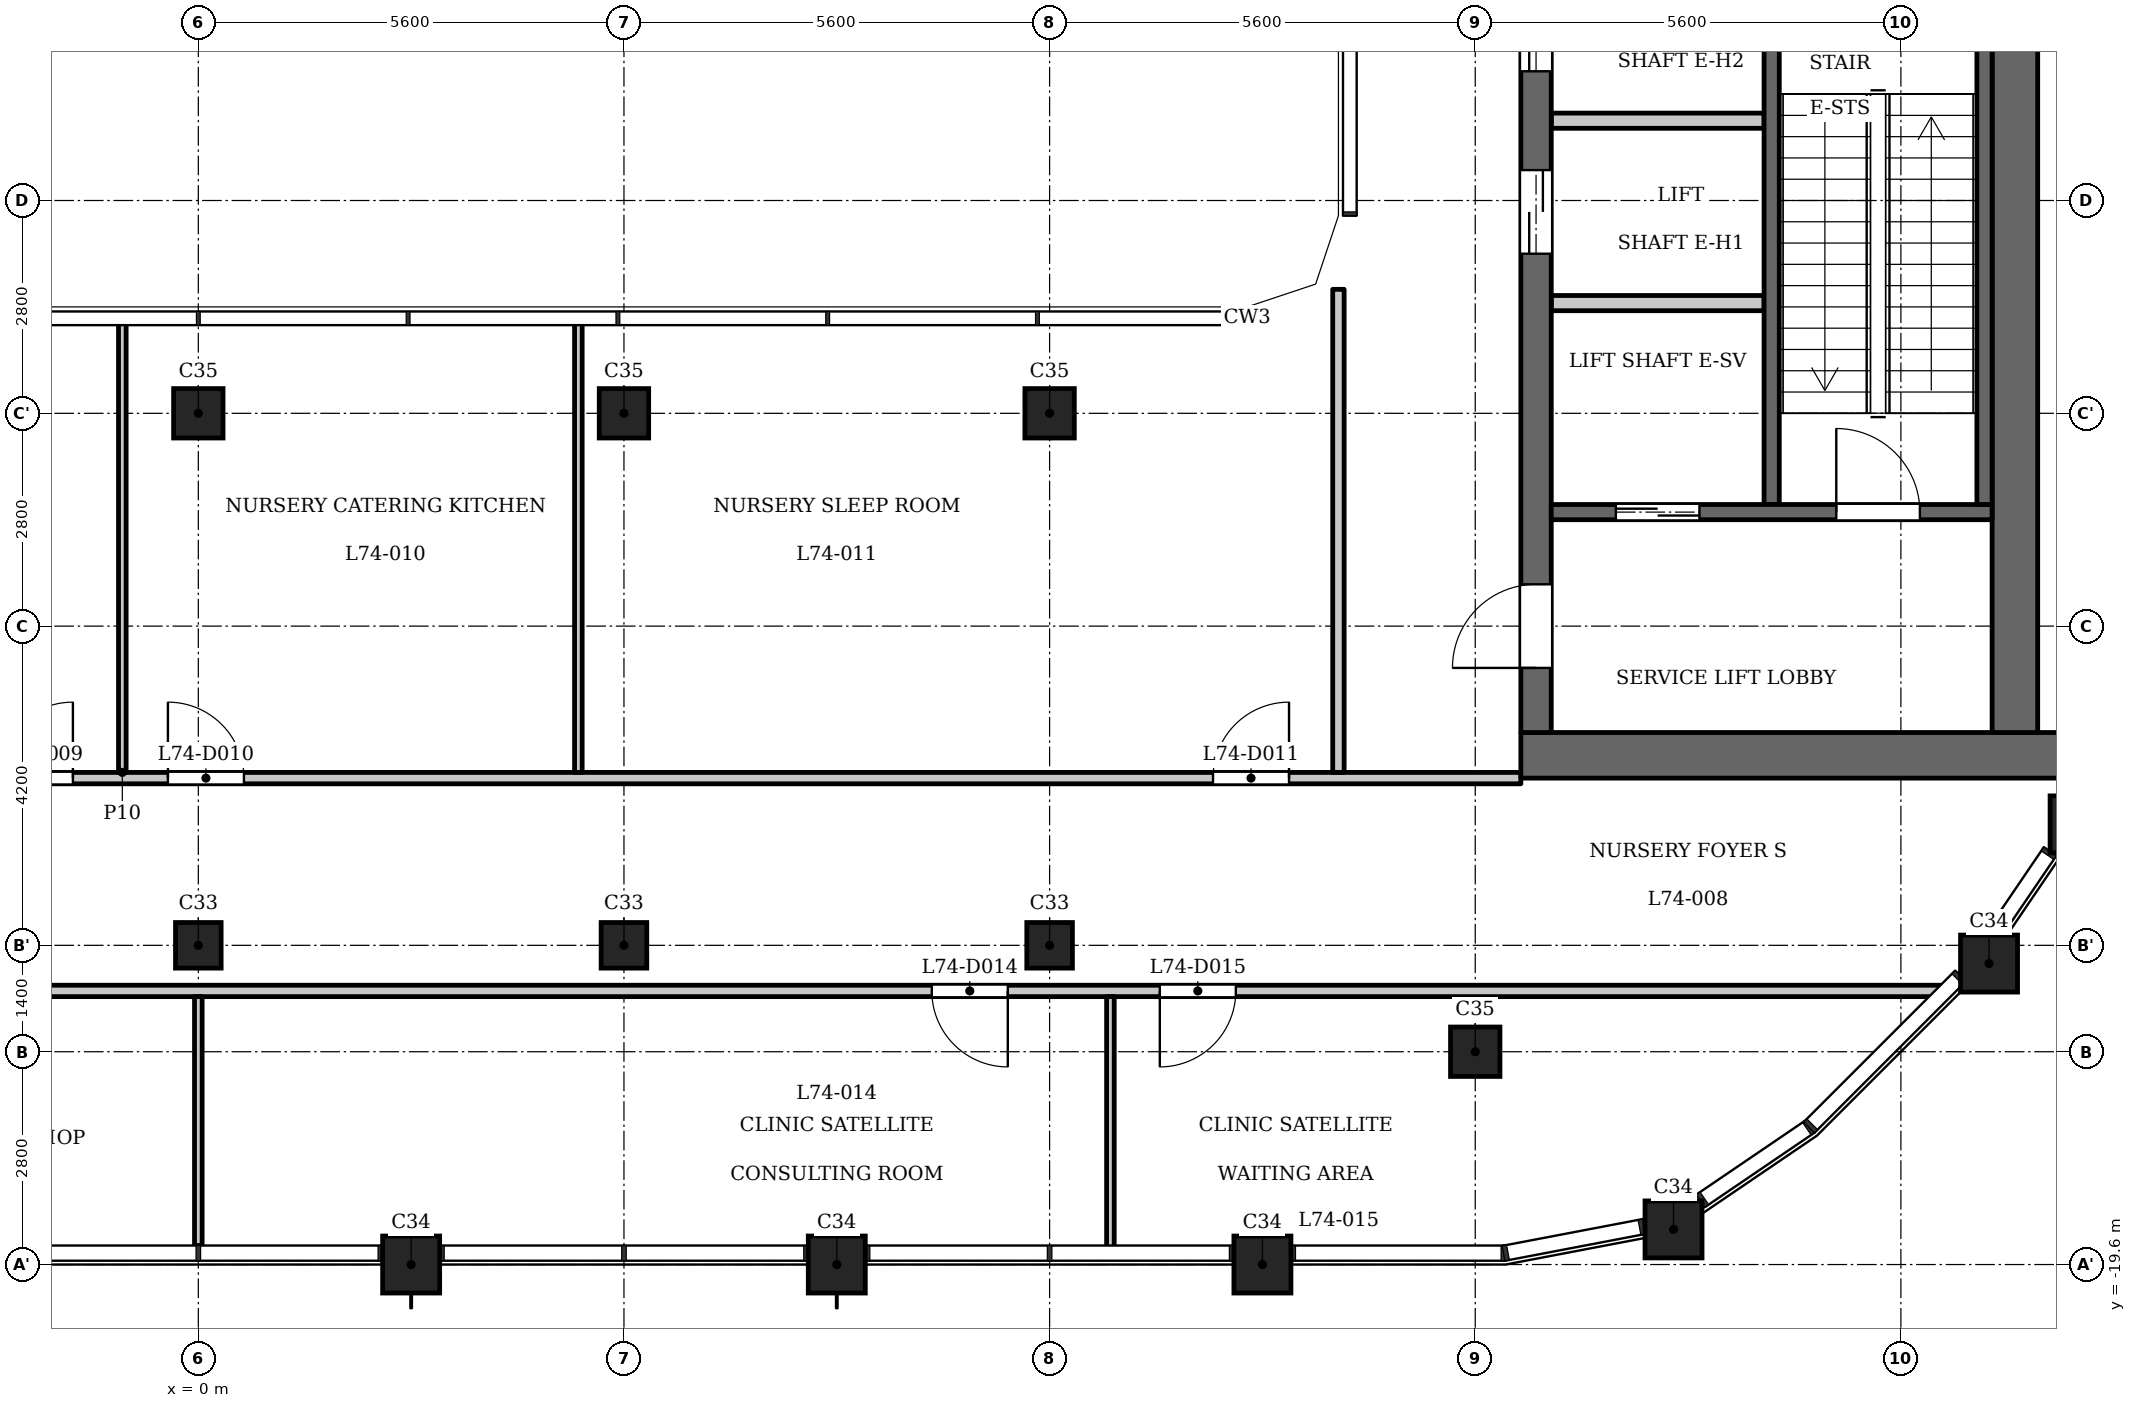
"""IFC4 building model, lengths in metres.
Left out: names, types, materials, properties, quantities, classifications, styles, units other than length and angle.
Written with IfcOpenShell. Run it as: python <this file> out.ifc"""

import sys

from ifc_helpers import new_model, si_unit, direction, frame, frame_2d, origin, origin_2d, place, context, subcontext, project, spatial, polyline, rectangle, outline, extrude, element, fill, save


model = new_model("IFC4")
c1 = context("Model", 3, precision=1e-05, world=origin(), true_north=direction((0.0, 1.0)))
c2 = subcontext(c1, "Body", "Model", "MODEL_VIEW")
j1 = project(units=[si_unit("LENGTHUNIT", "METRE"), si_unit("PLANEANGLEUNIT", "RADIAN")], contexts=[c1])
p1 = place(None, origin())
s1 = spatial("IfcSite", under=j1, at=p1, CompositionType="ELEMENT")
p2 = place(p1, origin())
s2 = spatial("IfcBuilding", under=s1, at=p2, CompositionType="ELEMENT")
p3 = place(p2, frame((0.0, 0.0, 283.7)))
s3 = spatial("IfcBuildingStorey", under=s2, at=p3, CompositionType="ELEMENT", Elevation=283.7)
for number, where, z_axis, x_axis in (
    (1, (2.8, -19.6, 0.0), (0.0, 0.0, 1.0), (1.0, 0.0, 0.0)),
    (2, (8.4, -19.6, 0.0), (0.0, 0.0, 1.0), (1.0, 0.0, 0.0)),
    (3, (14.0, -19.6, 0.0), (0.0, 0.0, 1.0), (1.0, 0.0, 0.0)),
    (4, (19.409, -19.138, 0.0), (0.0, 0.0, 1.0), (1.0, 0.0, 0.0)),
    (5, (23.56, -15.64, 0.0), (0.0, 0.0, 1.0), (1.0, 0.0, 0.0)),
    (6, (24.738, -13.809, 0.0), (0.0, 0.0, 1.0), (1.0, 0.0, 0.0)),
):
    element("IfcColumn", number, at=place(p3, frame(where, z_axis=z_axis, x_axis=x_axis)), inside=s3, PredefinedType="COLUMN", context=c2, shape_type="SweptSolid", body=[
        extrude(rectangle(XDim=0.75, YDim=0.75, at=origin_2d()), origin(), (0.0, 0.0, 1.0), 5.4),
    ])
for number, where, z_axis, x_axis in (
    (7, (0.0, -8.4, 0.0), (0.0, 0.0, 1.0), (1.0, 0.0, 0.0)),
    (8, (5.6, -8.4, 0.0), (0.0, 0.0, 1.0), (1.0, 0.0, 0.0)),
    (9, (11.2, -8.4, 0.0), (0.0, 0.0, 1.0), (1.0, 0.0, 0.0)),
    (10, (16.8, -16.8, 0.0), (0.0, 0.0, 1.0), (1.0, 0.0, 0.0)),
):
    element("IfcColumn", number, at=place(p3, frame(where, z_axis=z_axis, x_axis=x_axis)), inside=s3, PredefinedType="COLUMN", context=c2, shape_type="SweptSolid", body=[
        extrude(rectangle(XDim=0.65, YDim=0.65, at=origin_2d()), origin(), (0.0, 0.0, 1.0), 5.4),
    ])
for number, where, z_axis, x_axis in (
    (11, (0.0, -15.4, 0.0), (0.0, 0.0, 1.0), (1.0, 0.0, 0.0)),
    (12, (5.6, -15.4, 0.0), (0.0, 0.0, 1.0), (1.0, 0.0, 0.0)),
    (13, (11.2, -15.4, 0.0), (0.0, 0.0, 1.0), (1.0, 0.0, 0.0)),
):
    element("IfcColumn", number, at=place(p3, frame(where, z_axis=z_axis, x_axis=x_axis)), inside=s3, PredefinedType="COLUMN", context=c2, shape_type="SweptSolid", body=[
        extrude(rectangle(XDim=0.6, YDim=0.6, at=origin_2d()), origin(), (0.0, 0.0, 1.0), 5.4),
    ])
p4 = place(p3, frame((20.7, -9.6, 0.0), z_axis=(0.0, 0.0, 1.0), x_axis=(0.0, 1.0, 0.0)))
e14 = element("IfcWall", 14, at=p4, inside=s3, PredefinedType="SHEAR", context=c2, shape_type="SweptSolid", body=[
    extrude(rectangle(XDim=7.35, YDim=0.2, at=frame_2d((3.675, 0.0))), origin(), (0.0, 0.0, 1.0), 4.95),
])
p5 = place(p3, frame((17.4, -12.9, 0.0), z_axis=(0.0, 0.0, 1.0), x_axis=(1.0, 0.0, 0.0)))
e15 = element("IfcWall", 15, at=p5, inside=s3, PredefinedType="SHEAR", context=c2, shape_type="SweptSolid", body=[
    extrude(rectangle(XDim=7.32, YDim=0.6, at=frame_2d((3.66, 0.0))), origin(), (0.0, 0.0, 1.0), 4.95),
])
p6 = place(p3, frame((17.6, -12.6, 0.0), z_axis=(0.0, 0.0, 1.0), x_axis=(0.0, 1.0, 0.0)))
e16 = element("IfcWall", 16, at=p6, inside=s3, PredefinedType="SHEAR", context=c2, shape_type="SweptSolid", body=[
    extrude(rectangle(XDim=25.2, YDim=0.4, at=frame_2d((12.6, 0.0))), origin(), (0.0, 0.0, 1.0), 4.95),
])
p7 = place(p6, frame((6.3, 0.0, 0.0)))
e17 = element("IfcOpeningElement", 17, at=p7, cuts=e16, PredefinedType="OPENING", context=c2, shape_type="SweptSolid", body=[
    extrude(rectangle(XDim=1.1, YDim=2.1, at=frame_2d((0.55, 1.05))), frame((0.0, 0.21, 0.0), z_axis=(0.0, -1.0, 0.0), x_axis=(1.0, 0.0, 0.0)), (0.0, 0.0, 1.0), 0.42),
])
p8 = place(p6, frame((8.7, 0.0, 0.0)))
e18 = element("IfcOpeningElement", 18, at=p8, cuts=e16, PredefinedType="OPENING", context=c2, shape_type="SweptSolid", body=[
    extrude(rectangle(XDim=1.1, YDim=2.1, at=frame_2d((0.55, 1.05))), frame((0.0, 0.21, 0.0), z_axis=(0.0, -1.0, 0.0), x_axis=(1.0, 0.0, 0.0)), (0.0, 0.0, 1.0), 0.42),
])
p9 = place(p6, frame((11.2, 0.0, 0.0)))
e19 = element("IfcOpeningElement", 19, at=p9, cuts=e16, PredefinedType="OPENING", context=c2, shape_type="SweptSolid", body=[
    extrude(rectangle(XDim=0.9, YDim=2.1, at=frame_2d((0.45, 1.05))), frame((0.0, 0.21, 0.0), z_axis=(0.0, -1.0, 0.0), x_axis=(1.0, 0.0, 0.0)), (0.0, 0.0, 1.0), 0.42),
])
p10 = place(p6, frame((17.05, 0.0, 0.0)))
e20 = element("IfcOpeningElement", 20, at=p10, cuts=e16, PredefinedType="OPENING", context=c2, shape_type="SweptSolid", body=[
    extrude(rectangle(XDim=0.9, YDim=2.1, at=frame_2d((0.45, 1.05))), frame((0.0, 0.21, 0.0), z_axis=(0.0, -1.0, 0.0), x_axis=(1.0, 0.0, 0.0)), (0.0, 0.0, 1.0), 0.42),
])
p11 = place(p6, frame((23.25, 0.0, 0.0)))
e21 = element("IfcOpeningElement", 21, at=p11, cuts=e16, PredefinedType="OPENING", context=c2, shape_type="SweptSolid", body=[
    extrude(rectangle(XDim=1.1, YDim=2.1, at=frame_2d((0.55, 1.05))), frame((0.0, 0.21, 0.0), z_axis=(0.0, -1.0, 0.0), x_axis=(1.0, 0.0, 0.0)), (0.0, 0.0, 1.0), 0.42),
])
p12 = place(p6, frame((0.85, 0.0, 0.0)))
e22 = element("IfcOpeningElement", 22, at=p12, cuts=e16, PredefinedType="OPENING", context=c2, shape_type="SweptSolid", body=[
    extrude(rectangle(XDim=1.1, YDim=2.1, at=frame_2d((0.55, 1.05))), frame((0.0, 0.21, 0.0), z_axis=(0.0, -1.0, 0.0), x_axis=(1.0, 0.0, 0.0)), (0.0, 0.0, 1.0), 0.42),
])
p13 = place(p6, frame((13.075, 0.0, 0.0)))
e23 = element("IfcOpeningElement", 23, at=p13, cuts=e16, PredefinedType="OPENING", context=c2, shape_type="SweptSolid", body=[
    extrude(rectangle(XDim=1.8, YDim=2.1, at=frame_2d((0.9, 1.05))), frame((0.0, 0.21, 0.0), z_axis=(0.0, -1.0, 0.0), x_axis=(1.0, 0.0, 0.0)), (0.0, 0.0, 1.0), 0.42),
])
p14 = place(p3, frame((23.9, -12.6, 0.0), z_axis=(0.0, 0.0, 1.0), x_axis=(0.0, 1.0, 0.0)))
e24 = element("IfcWall", 24, at=p14, inside=s3, PredefinedType="SHEAR", context=c2, shape_type="SweptSolid", body=[
    extrude(rectangle(XDim=25.2, YDim=0.6, at=frame_2d((12.6, 0.0))), origin(), (0.0, 0.0, 1.0), 4.95),
])
p15 = place(p3, frame((17.8, -9.7, 0.0), z_axis=(0.0, 0.0, 1.0), x_axis=(1.0, 0.0, 0.0)))
e25 = element("IfcWall", 25, at=p15, inside=s3, PredefinedType="SHEAR", context=c2, shape_type="SweptSolid", body=[
    extrude(rectangle(XDim=5.8, YDim=0.2, at=frame_2d((2.9, 0.0))), origin(), (0.0, 0.0, 1.0), 4.95),
])
p16 = place(p15, frame((0.85, 0.0, 0.0)))
e26 = element("IfcOpeningElement", 26, at=p16, cuts=e25, PredefinedType="OPENING", context=c2, shape_type="SweptSolid", body=[
    extrude(rectangle(XDim=1.1, YDim=2.1, at=frame_2d((0.55, 1.05))), frame((0.0, 0.11, 0.0), z_axis=(0.0, -1.0, 0.0), x_axis=(1.0, 0.0, 0.0)), (0.0, 0.0, 1.0), 0.22),
])
p17 = place(p15, frame((3.75, 0.0, 0.0)))
e27 = element("IfcOpeningElement", 27, at=p17, cuts=e25, PredefinedType="OPENING", context=c2, shape_type="SweptSolid", body=[
    extrude(rectangle(XDim=1.1, YDim=2.1, at=frame_2d((0.55, 1.05))), frame((0.0, 0.11, 0.0), z_axis=(0.0, -1.0, 0.0), x_axis=(1.0, 0.0, 0.0)), (0.0, 0.0, 1.0), 0.22),
])
for number, where, z_axis, x_axis in (
    (28, (17.8, -6.95, 0.0), (0.0, 0.0, 1.0), (1.0, 0.0, 0.0)),
    (29, (17.8, -4.55, 0.0), (0.0, 0.0, 1.0), (1.0, 0.0, 0.0)),
):
    element("IfcWall", number, at=place(p3, frame(where, z_axis=z_axis, x_axis=x_axis)), inside=s3, PredefinedType="PARTITIONING", context=c2, shape_type="SweptSolid", body=[
        extrude(rectangle(XDim=2.8, YDim=0.2, at=frame_2d((1.4, 0.0))), origin(), (0.0, 0.0, 1.0), 4.95),
    ])
p18 = place(p3, frame((23.5, -9.6, 0.0), z_axis=(0.0, 0.0, 1.0), x_axis=(0.0, 1.0, 0.0)))
e30 = element("IfcWall", 30, at=p18, inside=s3, PredefinedType="SHEAR", context=c2, shape_type="SweptSolid", body=[
    extrude(rectangle(XDim=6.9, YDim=0.2, at=frame_2d((3.45, 0.0))), origin(), (0.0, 0.0, 1.0), 4.95),
])
p19 = place(p3, frame((-22.948, -16.0, 0.0), z_axis=(0.0, 0.0, 1.0), x_axis=(1.0, 0.0, 0.0)))
e31 = element("IfcWall", 31, at=p19, inside=s3, PredefinedType="PARTITIONING", context=c2, shape_type="SweptSolid", body=[
    extrude(rectangle(XDim=45.896, YDim=0.15, at=frame_2d((22.948, 0.0))), origin(), (0.0, 0.0, 1.0), 4.95),
])
p20 = place(p19, frame((10.275, 0.0, 0.0)))
e32 = element("IfcOpeningElement", 32, at=p20, cuts=e31, PredefinedType="OPENING", context=c2, shape_type="SweptSolid", body=[
    extrude(rectangle(XDim=1.0, YDim=2.1, at=frame_2d((0.5, 1.05))), frame((0.0, 0.085, 0.0), z_axis=(0.0, -1.0, 0.0), x_axis=(1.0, 0.0, 0.0)), (0.0, 0.0, 1.0), 0.17),
])
p21 = place(p19, frame((13.598, 0.0, 0.0)))
e33 = element("IfcOpeningElement", 33, at=p21, cuts=e31, PredefinedType="OPENING", context=c2, shape_type="SweptSolid", body=[
    extrude(rectangle(XDim=1.0, YDim=2.1, at=frame_2d((0.5, 1.05))), frame((0.0, 0.085, 0.0), z_axis=(0.0, -1.0, 0.0), x_axis=(1.0, 0.0, 0.0)), (0.0, 0.0, 1.0), 0.17),
])
p22 = place(p19, frame((32.598, 0.0, 0.0)))
e34 = element("IfcOpeningElement", 34, at=p22, cuts=e31, PredefinedType="OPENING", context=c2, shape_type="SweptSolid", body=[
    extrude(rectangle(XDim=1.0, YDim=2.1, at=frame_2d((0.5, 1.05))), frame((0.0, 0.085, 0.0), z_axis=(0.0, -1.0, 0.0), x_axis=(1.0, 0.0, 0.0)), (0.0, 0.0, 1.0), 0.17),
])
p23 = place(p19, frame((35.598, 0.0, 0.0)))
e35 = element("IfcOpeningElement", 35, at=p23, cuts=e31, PredefinedType="OPENING", context=c2, shape_type="SweptSolid", body=[
    extrude(rectangle(XDim=1.0, YDim=2.1, at=frame_2d((0.5, 1.05))), frame((0.0, 0.085, 0.0), z_axis=(0.0, -1.0, 0.0), x_axis=(1.0, 0.0, 0.0)), (0.0, 0.0, 1.0), 0.17),
])
p24 = place(p3, frame((-17.4, -13.2, 0.0), z_axis=(0.0, 0.0, 1.0), x_axis=(1.0, 0.0, 0.0)))
e36 = element("IfcWall", 36, at=p24, inside=s3, PredefinedType="PARTITIONING", context=c2, shape_type="SweptSolid", body=[
    extrude(rectangle(XDim=34.8, YDim=0.15, at=frame_2d((17.4, 0.0))), origin(), (0.0, 0.0, 1.0), 4.95),
])
p25 = place(p24, frame((0.65, 0.0, 0.0)))
e37 = element("IfcOpeningElement", 37, at=p25, cuts=e36, PredefinedType="OPENING", context=c2, shape_type="SweptSolid", body=[
    extrude(rectangle(XDim=1.2, YDim=2.1, at=frame_2d((0.6, 1.05))), frame((0.0, 0.085, 0.0), z_axis=(0.0, -1.0, 0.0), x_axis=(1.0, 0.0, 0.0)), (0.0, 0.0, 1.0), 0.17),
])
p26 = place(p24, frame((14.75, 0.0, 0.0)))
e38 = element("IfcOpeningElement", 38, at=p26, cuts=e36, PredefinedType="OPENING", context=c2, shape_type="SweptSolid", body=[
    extrude(rectangle(XDim=1.0, YDim=2.1, at=frame_2d((0.5, 1.05))), frame((0.0, 0.085, 0.0), z_axis=(0.0, -1.0, 0.0), x_axis=(1.0, 0.0, 0.0)), (0.0, 0.0, 1.0), 0.17),
])
p27 = place(p24, frame((17.0, 0.0, 0.0)))
e39 = element("IfcOpeningElement", 39, at=p27, cuts=e36, PredefinedType="OPENING", context=c2, shape_type="SweptSolid", body=[
    extrude(rectangle(XDim=1.0, YDim=2.1, at=frame_2d((0.5, 1.05))), frame((0.0, 0.085, 0.0), z_axis=(0.0, -1.0, 0.0), x_axis=(1.0, 0.0, 0.0)), (0.0, 0.0, 1.0), 0.17),
])
p28 = place(p24, frame((30.75, 0.0, 0.0)))
e40 = element("IfcOpeningElement", 40, at=p28, cuts=e36, PredefinedType="OPENING", context=c2, shape_type="SweptSolid", body=[
    extrude(rectangle(XDim=1.0, YDim=2.1, at=frame_2d((0.5, 1.05))), frame((0.0, 0.085, 0.0), z_axis=(0.0, -1.0, 0.0), x_axis=(1.0, 0.0, 0.0)), (0.0, 0.0, 1.0), 0.17),
])
p29 = place(p3, frame((-1.0, -13.125, 0.0), z_axis=(0.0, 0.0, 1.0), x_axis=(0.0, 1.0, 0.0)))
e41 = element("IfcWall", 41, at=p29, inside=s3, PredefinedType="PARTITIONING", context=c2, shape_type="SweptSolid", body=[
    extrude(rectangle(XDim=5.943, YDim=0.1, at=frame_2d((2.972, 0.0))), origin(), (0.0, 0.0, 1.0), 4.95),
])
p30 = place(p3, frame((0.0, -19.35, 0.0), z_axis=(0.0, 0.0, 1.0), x_axis=(0.0, 1.0, 0.0)))
e42 = element("IfcWall", 42, at=p30, inside=s3, PredefinedType="PARTITIONING", context=c2, shape_type="SweptSolid", body=[
    extrude(rectangle(XDim=3.275, YDim=0.1, at=frame_2d((1.638, 0.0))), origin(), (0.0, 0.0, 1.0), 4.95),
])
p31 = place(p3, frame((5.0, -13.125, 0.0), z_axis=(0.0, 0.0, 1.0), x_axis=(0.0, 1.0, 0.0)))
e43 = element("IfcWall", 43, at=p31, inside=s3, PredefinedType="PARTITIONING", context=c2, shape_type="SweptSolid", body=[
    extrude(rectangle(XDim=5.943, YDim=0.1, at=frame_2d((2.972, 0.0))), origin(), (0.0, 0.0, 1.0), 4.95),
])
p32 = place(p3, frame((12.0, -19.416, 0.0), z_axis=(0.0, 0.0, 1.0), x_axis=(0.0, 1.0, 0.0)))
e44 = element("IfcWall", 44, at=p32, inside=s3, PredefinedType="PARTITIONING", context=c2, shape_type="SweptSolid", body=[
    extrude(rectangle(XDim=3.341, YDim=0.1, at=frame_2d((1.67, 0.0))), origin(), (0.0, 0.0, 1.0), 4.95),
])
p33 = place(p3, frame((15.0, -13.125, 0.0), z_axis=(0.0, 0.0, 1.0), x_axis=(0.0, 1.0, 0.0)))
e45 = element("IfcWall", 45, at=p33, inside=s3, PredefinedType="PARTITIONING", context=c2, shape_type="SweptSolid", body=[
    extrude(rectangle(XDim=6.356, YDim=0.15, at=frame_2d((3.178, 0.0))), origin(), (0.0, 0.0, 1.0), 4.95),
])
p34 = place(p3, origin())
e46 = element("IfcWall", 46, at=p34, inside=s3, PredefinedType="SOLIDWALL", context=c2, shape_type="SweptSolid", body=[
    extrude(outline(polyline([(14.937, -6.937), (15.3, -5.849), (15.3, -5.8), (15.0, -5.8), (14.7, -6.7), (13.8, -7.0), (13.8, -7.3), (13.849, -7.3), (14.937, -6.937)])), origin(), (0.0, 0.0, 1.0), 4.95),
])
p35 = place(p16, origin())
e47 = element("IfcDoor", 47, at=p35, inside=s3, OperationType="DOUBLE_DOOR_SLIDING", PredefinedType="DOOR", context=c2, shape_type="SweptSolid", body=[
    extrude(rectangle(XDim=1.1, YDim=2.1, at=frame_2d((0.55, 1.05))), frame((0.0, 0.025, 0.0), z_axis=(0.0, -1.0, 0.0), x_axis=(1.0, 0.0, 0.0)), (0.0, 0.0, 1.0), 0.05),
])
fill(e26, e47)
p36 = place(p7, origin())
e48 = element("IfcDoor", 48, at=p36, inside=s3, OperationType="DOUBLE_DOOR_SLIDING", PredefinedType="DOOR", context=c2, shape_type="SweptSolid", body=[
    extrude(rectangle(XDim=1.1, YDim=2.1, at=frame_2d((0.55, 1.05))), frame((0.0, 0.025, 0.0), z_axis=(0.0, -1.0, 0.0), x_axis=(1.0, 0.0, 0.0)), (0.0, 0.0, 1.0), 0.05),
])
fill(e17, e48)
p37 = place(p8, origin())
e49 = element("IfcDoor", 49, at=p37, inside=s3, OperationType="DOUBLE_DOOR_SLIDING", PredefinedType="DOOR", context=c2, shape_type="SweptSolid", body=[
    extrude(rectangle(XDim=1.1, YDim=2.1, at=frame_2d((0.55, 1.05))), frame((0.0, 0.025, 0.0), z_axis=(0.0, -1.0, 0.0), x_axis=(1.0, 0.0, 0.0)), (0.0, 0.0, 1.0), 0.05),
])
fill(e18, e49)
p38 = place(p12, origin())
e50 = element("IfcDoor", 50, at=p38, inside=s3, OperationType="SINGLE_SWING_RIGHT", PredefinedType="DOOR", context=c2, shape_type="SweptSolid", body=[
    extrude(rectangle(XDim=1.1, YDim=2.1, at=frame_2d((0.55, 1.05))), frame((0.0, 0.025, 0.0), z_axis=(0.0, -1.0, 0.0), x_axis=(1.0, 0.0, 0.0)), (0.0, 0.0, 1.0), 0.05),
])
fill(e22, e50)
p39 = place(p17, origin())
e51 = element("IfcDoor", 51, at=p39, inside=s3, OperationType="SINGLE_SWING_RIGHT", PredefinedType="DOOR", context=c2, shape_type="SweptSolid", body=[
    extrude(rectangle(XDim=1.1, YDim=2.1, at=frame_2d((0.55, 1.05))), frame((0.0, 0.025, 0.0), z_axis=(0.0, -1.0, 0.0), x_axis=(1.0, 0.0, 0.0)), (0.0, 0.0, 1.0), 0.05),
])
fill(e27, e51)
p40 = place(p26, origin())
e52 = element("IfcDoor", 52, at=p40, inside=s3, OperationType="SINGLE_SWING_LEFT", PredefinedType="DOOR", context=c2, shape_type="SweptSolid", body=[
    extrude(rectangle(XDim=1.0, YDim=2.1, at=frame_2d((0.5, 1.05))), frame((0.0, 0.025, 0.0), z_axis=(0.0, -1.0, 0.0), x_axis=(1.0, 0.0, 0.0)), (0.0, 0.0, 1.0), 0.05),
])
fill(e38, e52)
p41 = place(p27, origin())
e53 = element("IfcDoor", 53, at=p41, inside=s3, OperationType="SINGLE_SWING_RIGHT", PredefinedType="DOOR", context=c2, shape_type="SweptSolid", body=[
    extrude(rectangle(XDim=1.0, YDim=2.1, at=frame_2d((0.5, 1.05))), frame((0.0, 0.025, 0.0), z_axis=(0.0, -1.0, 0.0), x_axis=(1.0, 0.0, 0.0)), (0.0, 0.0, 1.0), 0.05),
])
fill(e39, e53)
p42 = place(p28, origin())
e54 = element("IfcDoor", 54, at=p42, inside=s3, OperationType="SINGLE_SWING_LEFT", PredefinedType="DOOR", context=c2, shape_type="SweptSolid", body=[
    extrude(rectangle(XDim=1.0, YDim=2.1, at=frame_2d((0.5, 1.05))), frame((0.0, 0.025, 0.0), z_axis=(0.0, -1.0, 0.0), x_axis=(1.0, 0.0, 0.0)), (0.0, 0.0, 1.0), 0.05),
])
fill(e40, e54)
p43 = place(p22, origin())
e55 = element("IfcDoor", 55, at=p43, inside=s3, OperationType="SINGLE_SWING_RIGHT", PredefinedType="DOOR", context=c2, shape_type="SweptSolid", body=[
    extrude(rectangle(XDim=1.0, YDim=2.1, at=frame_2d((0.5, 1.05))), frame((0.0, 0.025, 0.0), z_axis=(0.0, -1.0, 0.0), x_axis=(1.0, 0.0, 0.0)), (0.0, 0.0, 1.0), 0.05),
])
fill(e34, e55)
p44 = place(p23, origin())
e56 = element("IfcDoor", 56, at=p44, inside=s3, OperationType="SINGLE_SWING_LEFT", PredefinedType="DOOR", context=c2, shape_type="SweptSolid", body=[
    extrude(rectangle(XDim=1.0, YDim=2.1, at=frame_2d((0.5, 1.05))), frame((0.0, 0.025, 0.0), z_axis=(0.0, -1.0, 0.0), x_axis=(1.0, 0.0, 0.0)), (0.0, 0.0, 1.0), 0.05),
])
fill(e35, e56)
save(model, sys.argv[1])
